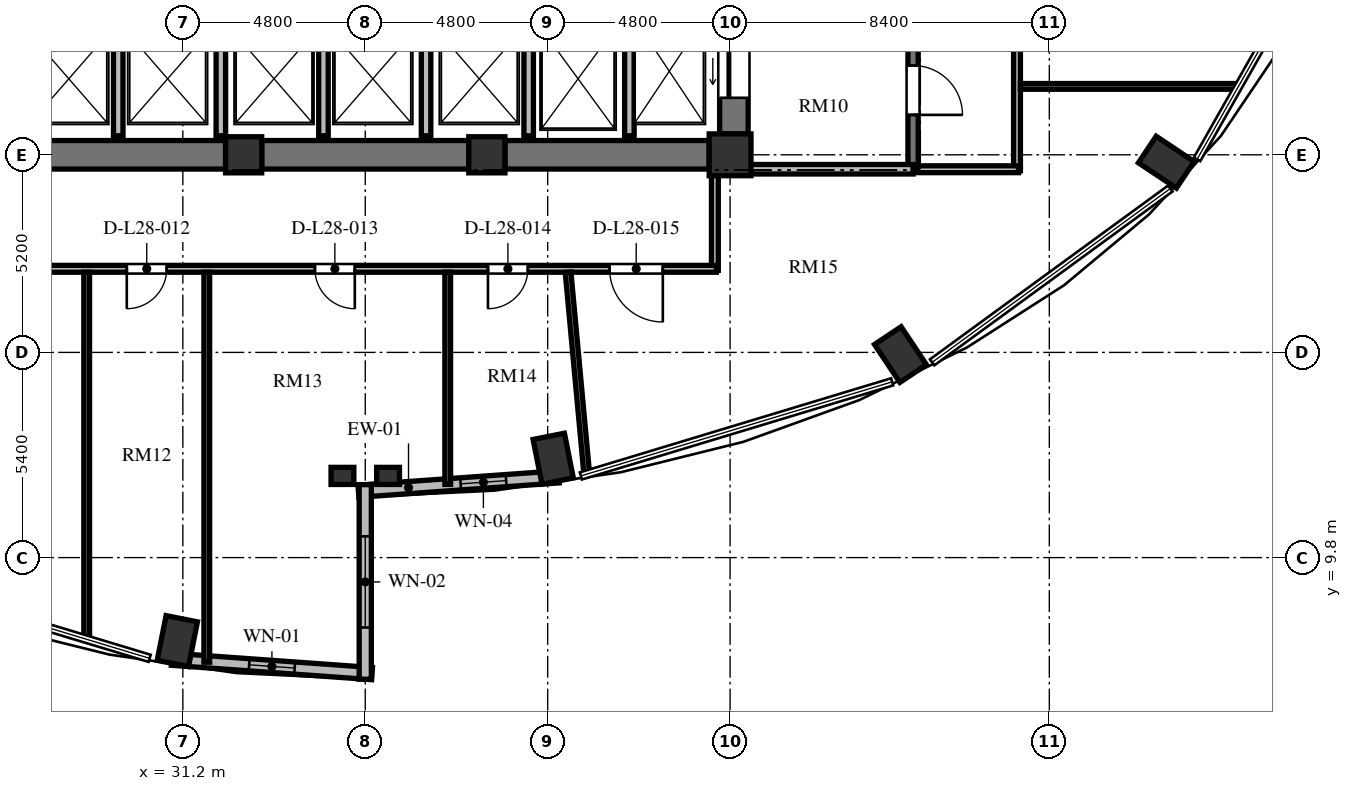
"""IFC4 building model, lengths in metres.
Left out: names, types, materials, properties, quantities, classifications, styles, units other than length and angle.
Written with IfcOpenShell. Run it as: python <this file> out.ifc"""

import sys

from ifc_helpers import new_model, si_unit, direction, frame, frame_2d, origin, origin_2d, place, context, subcontext, project, spatial, rectangle, extrude, element, fill, save


model = new_model("IFC4")
c1 = context("Model", 3, precision=1e-05, world=origin(), true_north=direction((0.0, 1.0)))
c2 = subcontext(c1, "Body", "Model", "MODEL_VIEW")
j1 = project(units=[si_unit("LENGTHUNIT", "METRE"), si_unit("PLANEANGLEUNIT", "RADIAN")], contexts=[c1])
p1 = place(None, origin())
s1 = spatial("IfcSite", under=j1, at=p1, CompositionType="ELEMENT")
p2 = place(p1, origin())
s2 = spatial("IfcBuilding", under=s1, at=p2, CompositionType="ELEMENT")
p3 = place(p2, frame((0.0, 0.0, 110.928)))
s3 = spatial("IfcBuildingStorey", under=s2, at=p3, CompositionType="ELEMENT", Elevation=110.928)
for number, where, z_axis, x_axis in (
    (1, (40.946, 12.403, 0.0), (0.0, 0.0, 1.0), (0.195, -0.981, 0.0)),
    (2, (50.084, 15.143, 0.0), (0.0, 0.0, 1.0), (0.556, -0.831, 0.0)),
    (3, (57.078, 20.205, 0.0), (0.0, 0.0, 1.0), (0.831, -0.556, 0.0)),
    (4, (31.054, 7.603, 0.0), (0.0, 0.0, 1.0), (-0.195, -0.981, 0.0)),
):
    element("IfcColumn", number, at=place(p3, frame(where, z_axis=z_axis, x_axis=x_axis)), inside=s3, PredefinedType="COLUMN", context=c2, shape_type="SweptSolid", body=[
        extrude(rectangle(XDim=1.2, YDim=0.84, at=origin_2d()), origin(), (0.0, 0.0, 1.0), 3.648),
    ])
for number, where, z_axis, x_axis in (
    (5, (32.8, 20.4, 0.0), (0.0, 0.0, 1.0), (1.0, 0.0, 0.0)),
    (6, (39.2, 20.4, 0.0), (0.0, 0.0, 1.0), (1.0, 0.0, 0.0)),
):
    element("IfcColumn", number, at=place(p3, frame(where, z_axis=z_axis, x_axis=x_axis)), inside=s3, PredefinedType="COLUMN", context=c2, shape_type="SweptSolid", body=[
        extrude(rectangle(XDim=0.95, YDim=0.95, at=origin_2d()), origin(), (0.0, 0.0, 1.0), 3.648),
    ])
p4 = place(p3, frame((45.6, 20.4, 0.0), z_axis=(0.0, 0.0, 1.0), x_axis=(1.0, 0.0, 0.0)))
e7 = element("IfcColumn", 7, at=p4, inside=s3, PredefinedType="COLUMN", context=c2, shape_type="SweptSolid", body=[
    extrude(rectangle(XDim=1.1, YDim=1.1, at=origin_2d()), origin(), (0.0, 0.0, 1.0), 3.648),
])
for number, where, z_axis, x_axis in (
    (8, (35.4, 11.95, 0.0), (0.0, 0.0, 1.0), (1.0, 0.0, 0.0)),
    (9, (36.6, 11.95, 0.0), (0.0, 0.0, 1.0), (1.0, 0.0, 0.0)),
):
    element("IfcColumn", number, at=place(p3, frame(where, z_axis=z_axis, x_axis=x_axis)), inside=s3, PredefinedType="PILASTER", context=c2, shape_type="SweptSolid", body=[
        extrude(rectangle(XDim=0.6, YDim=0.45, at=origin_2d()), origin(), (0.0, 0.0, 1.0), 3.648),
    ])
p5 = place(p3, frame((45.7, 20.95, 0.0), z_axis=(0.0, 0.0, 1.0), x_axis=(0.0, 1.0, 0.0)))
e10 = element("IfcWall", 10, at=p5, inside=s3, PredefinedType="SHEAR", context=c2, shape_type="SweptSolid", body=[
    extrude(rectangle(XDim=14.1, YDim=0.75, at=frame_2d((7.05, 0.0))), origin(), (0.0, 0.0, 1.0), 3.648),
])
p6 = place(p5, frame((11.75, 0.0, 0.0)))
e11 = element("IfcOpeningElement", 11, at=p6, cuts=e10, PredefinedType="OPENING", context=c2, shape_type="SweptSolid", body=[
    extrude(rectangle(XDim=1.4, YDim=2.3, at=frame_2d((0.7, 1.15))), frame((0.0, 0.385, 0.0), z_axis=(0.0, -1.0, 0.0), x_axis=(1.0, 0.0, 0.0)), (0.0, 0.0, 1.0), 0.77),
])
p7 = place(p5, frame((0.95, 0.0, 0.0)))
e12 = element("IfcOpeningElement", 12, at=p7, cuts=e10, PredefinedType="OPENING", context=c2, shape_type="SweptSolid", body=[
    extrude(rectangle(XDim=1.4, YDim=2.3, at=frame_2d((0.7, 1.15))), frame((0.0, 0.385, 0.0), z_axis=(0.0, -1.0, 0.0), x_axis=(1.0, 0.0, 0.0)), (0.0, 0.0, 1.0), 0.77),
])
p8 = place(p3, frame((26.95, 20.4, 0.0), z_axis=(0.0, 0.0, 1.0), x_axis=(1.0, 0.0, 0.0)))
e13 = element("IfcWall", 13, at=p8, inside=s3, PredefinedType="SHEAR", context=c2, shape_type="SweptSolid", body=[
    extrude(rectangle(XDim=5.375, YDim=0.75, at=frame_2d((2.688, 0.0))), origin(), (0.0, 0.0, 1.0), 3.648),
])
p9 = place(p3, frame((33.275, 20.4, 0.0), z_axis=(0.0, 0.0, 1.0), x_axis=(1.0, 0.0, 0.0)))
e14 = element("IfcWall", 14, at=p9, inside=s3, PredefinedType="SHEAR", context=c2, shape_type="SweptSolid", body=[
    extrude(rectangle(XDim=5.45, YDim=0.75, at=frame_2d((2.725, 0.0))), origin(), (0.0, 0.0, 1.0), 3.648),
])
p10 = place(p3, frame((39.675, 20.4, 0.0), z_axis=(0.0, 0.0, 1.0), x_axis=(1.0, 0.0, 0.0)))
e15 = element("IfcWall", 15, at=p10, inside=s3, PredefinedType="SHEAR", context=c2, shape_type="SweptSolid", body=[
    extrude(rectangle(XDim=5.375, YDim=0.75, at=frame_2d((2.688, 0.0))), origin(), (0.0, 0.0, 1.0), 3.648),
])
p11 = place(p3, frame((35.821, 11.547, 0.0), z_axis=(0.0, 0.0, 1.0), x_axis=(0.997432364291, 0.071614793619, 0.0)))
e16 = element("IfcWall", 16, at=p11, inside=s3, PredefinedType="SOLIDWALL", context=c2, shape_type="SweptSolid", body=[
    extrude(rectangle(XDim=5.284, YDim=0.32, at=frame_2d((2.642, 0.0))), origin(), (0.0, 0.0, 1.0), 3.428),
])
p12 = place(p11, frame((2.697, 0.0, 0.85)))
e17 = element("IfcOpeningElement", 17, at=p12, cuts=e16, PredefinedType="OPENING", context=c2, shape_type="SweptSolid", body=[
    extrude(rectangle(XDim=1.2, YDim=1.8, at=frame_2d((0.6, 0.9))), frame((0.0, 0.17, 0.0), z_axis=(0.0, -1.0, 0.0), x_axis=(1.0, 0.0, 0.0)), (0.0, 0.0, 1.0), 0.34),
])
p13 = place(p3, frame((30.909, 7.125, 0.0), z_axis=(0.0, 0.0, 1.0), x_axis=(0.997431890304, -0.071621394884, 0.0)))
e18 = element("IfcWall", 18, at=p13, inside=s3, PredefinedType="SOLIDWALL", context=c2, shape_type="SweptSolid", body=[
    extrude(rectangle(XDim=5.284, YDim=0.32, at=frame_2d((2.642, 0.0))), origin(), (0.0, 0.0, 1.0), 3.428),
])
p14 = place(p13, frame((2.042, 0.0, 0.85)))
e19 = element("IfcOpeningElement", 19, at=p14, cuts=e18, PredefinedType="OPENING", context=c2, shape_type="SweptSolid", body=[
    extrude(rectangle(XDim=1.2, YDim=2.2, at=frame_2d((0.6, 1.1))), frame((0.0, 0.17, 0.0), z_axis=(0.0, -1.0, 0.0), x_axis=(1.0, 0.0, 0.0)), (0.0, 0.0, 1.0), 0.34),
])
p15 = place(p3, frame((36.0, 6.6, 0.0), z_axis=(0.0, 0.0, 1.0), x_axis=(0.0, 1.0, 0.0)))
e20 = element("IfcWall", 20, at=p15, inside=s3, PredefinedType="SOLIDWALL", context=c2, shape_type="SweptSolid", body=[
    extrude(rectangle(XDim=5.12, YDim=0.32, at=frame_2d((2.56, 0.0))), origin(), (0.0, 0.0, 1.0), 3.428),
])
p16 = place(p15, frame((1.36, 0.0, 0.84)))
e21 = element("IfcOpeningElement", 21, at=p16, cuts=e20, PredefinedType="OPENING", context=c2, shape_type="SweptSolid", body=[
    extrude(rectangle(XDim=2.4, YDim=2.04, at=frame_2d((1.2, 1.02))), frame((0.0, 0.17, 0.0), z_axis=(0.0, -1.0, 0.0), x_axis=(1.0, 0.0, 0.0)), (0.0, 0.0, 1.0), 0.34),
])
p17 = place(p3, frame((42.95, 20.9, 0.0), z_axis=(0.0, 0.0, 1.0), x_axis=(0.0, 1.0, 0.0)))
e22 = element("IfcWall", 22, at=p17, inside=s3, PredefinedType="SOLIDWALL", context=c2, shape_type="SweptSolid", body=[
    extrude(rectangle(XDim=3.2, YDim=0.25, at=frame_2d((1.6, 0.0))), origin(), (0.0, 0.0, 1.0), 3.428),
])
for number, where, z_axis, x_axis in (
    (23, (29.5, 20.9, 0.0), (0.0, 0.0, 1.0), (0.0, 1.0, 0.0)),
    (24, (32.2, 20.9, 0.0), (0.0, 0.0, 1.0), (0.0, 1.0, 0.0)),
    (25, (34.9, 20.9, 0.0), (0.0, 0.0, 1.0), (0.0, 1.0, 0.0)),
    (26, (37.6, 20.9, 0.0), (0.0, 0.0, 1.0), (0.0, 1.0, 0.0)),
    (27, (40.3, 20.9, 0.0), (0.0, 0.0, 1.0), (0.0, 1.0, 0.0)),
):
    element("IfcWall", number, at=place(p3, frame(where, z_axis=z_axis, x_axis=x_axis)), inside=s3, PredefinedType="SOLIDWALL", context=c2, shape_type="SweptSolid", body=[
        extrude(rectangle(XDim=2.8, YDim=0.25, at=frame_2d((1.4, 0.0))), origin(), (0.0, 0.0, 1.0), 3.428),
    ])
p18 = place(p3, frame((50.415, 35.845, 0.0), z_axis=(0.0, 0.0, 1.0), x_axis=(0.0, -1.0, 0.0)))
e28 = element("IfcWall", 28, at=p18, inside=s3, PredefinedType="SHEAR", context=c2, shape_type="SweptSolid", body=[
    extrude(rectangle(XDim=15.825, YDim=0.27, at=frame_2d((7.913, 0.0))), origin(), (0.0, 0.0, 1.0), 3.648),
])
p19 = place(p18, frame((4.445, 0.0, 0.0)))
e29 = element("IfcOpeningElement", 29, at=p19, cuts=e28, PredefinedType="OPENING", context=c2, shape_type="SweptSolid", body=[
    extrude(rectangle(XDim=1.2, YDim=2.15, at=frame_2d((0.6, 1.075))), frame((0.0, 0.145, 0.0), z_axis=(0.0, -1.0, 0.0), x_axis=(1.0, 0.0, 0.0)), (0.0, 0.0, 1.0), 0.29),
])
p20 = place(p18, frame((1.295, 0.0, 0.0)))
e30 = element("IfcOpeningElement", 30, at=p20, cuts=e28, PredefinedType="OPENING", context=c2, shape_type="SweptSolid", body=[
    extrude(rectangle(XDim=1.3, YDim=2.2, at=frame_2d((0.65, 1.1))), frame((0.0, 0.145, 0.0), z_axis=(0.0, -1.0, 0.0), x_axis=(1.0, 0.0, 0.0)), (0.0, 0.0, 1.0), 0.29),
])
p21 = place(p18, frame((13.095, 0.0, 0.0)))
e31 = element("IfcOpeningElement", 31, at=p21, cuts=e28, PredefinedType="OPENING", context=c2, shape_type="SweptSolid", body=[
    extrude(rectangle(XDim=1.3, YDim=2.2, at=frame_2d((0.65, 1.1))), frame((0.0, 0.145, 0.0), z_axis=(0.0, -1.0, 0.0), x_axis=(1.0, 0.0, 0.0)), (0.0, 0.0, 1.0), 0.29),
])
p22 = place(p3, frame((45.7, 20.02, 0.0), z_axis=(0.0, 0.0, 1.0), x_axis=(1.0, 0.0, 0.0)))
e32 = element("IfcWall", 32, at=p22, inside=s3, PredefinedType="SOLIDWALL", context=c2, shape_type="SweptSolid", body=[
    extrude(rectangle(XDim=4.715, YDim=0.25, at=frame_2d((2.357, 0.0))), origin(), (0.0, 0.0, 1.0), 3.428),
])
p23 = place(p3, frame((53.15, 26.64, 0.0), z_axis=(0.0, 0.0, 1.0), x_axis=(0.0, -1.0, 0.0)))
e33 = element("IfcWall", 33, at=p23, inside=s3, PredefinedType="PARTITIONING", context=c2, shape_type="SweptSolid", body=[
    extrude(rectangle(XDim=6.66, YDim=0.18, at=frame_2d((3.33, 0.0))), origin(), (0.0, 0.0, 1.0), 3.428),
])
p24 = place(p3, frame((53.19, 20.02, 0.0), z_axis=(0.0, 0.0, 1.0), x_axis=(-1.0, 0.0, 0.0)))
e34 = element("IfcWall", 34, at=p24, inside=s3, PredefinedType="PARTITIONING", context=c2, shape_type="SweptSolid", body=[
    extrude(rectangle(XDim=2.65, YDim=0.18, at=frame_2d((1.325, 0.0))), origin(), (0.0, 0.0, 1.0), 3.428),
])
p25 = place(p3, frame((45.2, 19.91, 0.0), z_axis=(0.0, 0.0, 1.0), x_axis=(0.0, -1.0, 0.0)))
e35 = element("IfcWall", 35, at=p25, inside=s3, PredefinedType="PARTITIONING", context=c2, shape_type="SweptSolid", body=[
    extrude(rectangle(XDim=2.55, YDim=0.18, at=frame_2d((1.275, 0.0))), origin(), (0.0, 0.0, 1.0), 3.428),
])
p26 = place(p3, frame((45.24, 17.4, 0.0), z_axis=(0.0, 0.0, 1.0), x_axis=(-1.0, 0.0, 0.0)))
e36 = element("IfcWall", 36, at=p26, inside=s3, PredefinedType="PARTITIONING", context=c2, shape_type="SweptSolid", body=[
    extrude(rectangle(XDim=21.93, YDim=0.18, at=frame_2d((10.965, 0.0))), origin(), (0.0, 0.0, 1.0), 3.053),
])
p27 = place(p26, frame((18.391, 0.0, 0.0)))
e37 = element("IfcOpeningElement", 37, at=p27, cuts=e36, PredefinedType="OPENING", context=c2, shape_type="SweptSolid", body=[
    extrude(rectangle(XDim=1.4, YDim=2.2, at=frame_2d((0.7, 1.1))), frame((0.0, 0.1, 0.0), z_axis=(0.0, -1.0, 0.0), x_axis=(1.0, 0.0, 0.0)), (0.0, 0.0, 1.0), 0.2),
])
p28 = place(p26, frame((14.465, 0.0, 0.0)))
e38 = element("IfcOpeningElement", 38, at=p28, cuts=e36, PredefinedType="OPENING", context=c2, shape_type="SweptSolid", body=[
    extrude(rectangle(XDim=1.05, YDim=2.15, at=frame_2d((0.525, 1.075))), frame((0.0, 0.1, 0.0), z_axis=(0.0, -1.0, 0.0), x_axis=(1.0, 0.0, 0.0)), (0.0, 0.0, 1.0), 0.2),
])
p29 = place(p26, frame((9.515, 0.0, 0.0)))
e39 = element("IfcOpeningElement", 39, at=p29, cuts=e36, PredefinedType="OPENING", context=c2, shape_type="SweptSolid", body=[
    extrude(rectangle(XDim=1.05, YDim=2.15, at=frame_2d((0.525, 1.075))), frame((0.0, 0.1, 0.0), z_axis=(0.0, -1.0, 0.0), x_axis=(1.0, 0.0, 0.0)), (0.0, 0.0, 1.0), 0.2),
])
p30 = place(p26, frame((4.961, 0.0, 0.0)))
e40 = element("IfcOpeningElement", 40, at=p30, cuts=e36, PredefinedType="OPENING", context=c2, shape_type="SweptSolid", body=[
    extrude(rectangle(XDim=1.05, YDim=2.15, at=frame_2d((0.525, 1.075))), frame((0.0, 0.1, 0.0), z_axis=(0.0, -1.0, 0.0), x_axis=(1.0, 0.0, 0.0)), (0.0, 0.0, 1.0), 0.2),
])
p31 = place(p26, frame((1.41, 0.0, 0.0)))
e41 = element("IfcOpeningElement", 41, at=p31, cuts=e36, PredefinedType="OPENING", context=c2, shape_type="SweptSolid", body=[
    extrude(rectangle(XDim=1.4, YDim=2.2, at=frame_2d((0.7, 1.1))), frame((0.0, 0.1, 0.0), z_axis=(0.0, -1.0, 0.0), x_axis=(1.0, 0.0, 0.0)), (0.0, 0.0, 1.0), 0.2),
])
p32 = place(p3, frame((53.24, 22.2, 0.0), z_axis=(0.0, 0.0, 1.0), x_axis=(1.0, 0.0, 0.0)))
e42 = element("IfcWall", 42, at=p32, inside=s3, PredefinedType="PARTITIONING", context=c2, shape_type="SweptSolid", body=[
    extrude(rectangle(XDim=5.731, YDim=0.15, at=frame_2d((2.866, 0.0))), origin(), (0.0, 0.0, 1.0), 3.428),
])
p33 = place(p3, frame((28.67, 7.664, 0.0), z_axis=(0.0, 0.0, 1.0), x_axis=(0.0, 1.0, 0.0)))
e43 = element("IfcWall", 43, at=p33, inside=s3, PredefinedType="PARTITIONING", context=c2, shape_type="SweptSolid", body=[
    extrude(rectangle(XDim=9.646, YDim=0.15, at=frame_2d((4.823, 0.0))), origin(), (0.0, 0.0, 1.0), 3.428),
])
p34 = place(p3, frame((31.83, 7.048, 0.0), z_axis=(0.0, 0.0, 1.0), x_axis=(0.0, 1.0, 0.0)))
e44 = element("IfcWall", 44, at=p34, inside=s3, PredefinedType="PARTITIONING", context=c2, shape_type="SweptSolid", body=[
    extrude(rectangle(XDim=10.262, YDim=0.15, at=frame_2d((5.131, 0.0))), origin(), (0.0, 0.0, 1.0), 2.813),
])
p35 = place(p3, frame((38.17, 11.727, 0.0), z_axis=(0.0, 0.0, 1.0), x_axis=(0.0, 1.0, 0.0)))
e45 = element("IfcWall", 45, at=p35, inside=s3, PredefinedType="PARTITIONING", context=c2, shape_type="SweptSolid", body=[
    extrude(rectangle(XDim=5.583, YDim=0.15, at=frame_2d((2.792, 0.0))), origin(), (0.0, 0.0, 1.0), 3.428),
])
p36 = place(p3, frame((41.829, 11.995, 0.0), z_axis=(0.0, 0.0, 1.0), x_axis=(-0.092106681554, 0.995749144721, 0.0)))
e46 = element("IfcWall", 46, at=p36, inside=s3, PredefinedType="PARTITIONING", context=c2, shape_type="SweptSolid", body=[
    extrude(rectangle(XDim=5.338, YDim=0.15, at=frame_2d((2.669, 0.0))), origin(), (0.0, 0.0, 1.0), 3.428),
])
p37 = place(p12, origin())
e47 = element("IfcWindow", 47, at=p37, inside=s3, PartitioningType="SINGLE_PANEL", PredefinedType="WINDOW", context=c2, shape_type="SweptSolid", body=[
    extrude(rectangle(XDim=1.2, YDim=1.8, at=frame_2d((0.6, 0.9))), frame((0.0, 0.03, 0.0), z_axis=(0.0, -1.0, 0.0), x_axis=(1.0, 0.0, 0.0)), (0.0, 0.0, 1.0), 0.06),
])
fill(e17, e47)
p38 = place(p14, origin())
e48 = element("IfcWindow", 48, at=p38, inside=s3, PartitioningType="SINGLE_PANEL", PredefinedType="WINDOW", context=c2, shape_type="SweptSolid", body=[
    extrude(rectangle(XDim=1.2, YDim=2.2, at=frame_2d((0.6, 1.1))), frame((0.0, 0.03, 0.0), z_axis=(0.0, -1.0, 0.0), x_axis=(1.0, 0.0, 0.0)), (0.0, 0.0, 1.0), 0.06),
])
fill(e19, e48)
p39 = place(p16, origin())
e49 = element("IfcWindow", 49, at=p39, inside=s3, PartitioningType="SINGLE_PANEL", PredefinedType="WINDOW", context=c2, shape_type="SweptSolid", body=[
    extrude(rectangle(XDim=2.4, YDim=2.04, at=frame_2d((1.2, 1.02))), frame((0.0, 0.03, 0.0), z_axis=(0.0, -1.0, 0.0), x_axis=(1.0, 0.0, 0.0)), (0.0, 0.0, 1.0), 0.06),
])
fill(e21, e49)
p40 = place(p7, origin())
e50 = element("IfcDoor", 50, at=p40, inside=s3, OperationType="SLIDING_TO_LEFT", PredefinedType="DOOR", context=c2, shape_type="SweptSolid", body=[
    extrude(rectangle(XDim=1.4, YDim=2.3, at=frame_2d((0.7, 1.15))), frame((0.0, 0.025, 0.0), z_axis=(0.0, -1.0, 0.0), x_axis=(1.0, 0.0, 0.0)), (0.0, 0.0, 1.0), 0.05),
])
fill(e12, e50)
p41 = place(p21, origin())
e51 = element("IfcDoor", 51, at=p41, inside=s3, OperationType="SINGLE_SWING_RIGHT", PredefinedType="DOOR", context=c2, shape_type="SweptSolid", body=[
    extrude(rectangle(XDim=1.3, YDim=2.2, at=frame_2d((0.65, 1.1))), frame((0.0, 0.025, 0.0), z_axis=(0.0, -1.0, 0.0), x_axis=(1.0, 0.0, 0.0)), (0.0, 0.0, 1.0), 0.05),
])
fill(e31, e51)
p42 = place(p28, origin())
e52 = element("IfcDoor", 52, at=p42, inside=s3, OperationType="SINGLE_SWING_RIGHT", PredefinedType="DOOR", context=c2, shape_type="SweptSolid", body=[
    extrude(rectangle(XDim=1.05, YDim=2.15, at=frame_2d((0.525, 1.075))), frame((0.0, 0.025, 0.0), z_axis=(0.0, -1.0, 0.0), x_axis=(1.0, 0.0, 0.0)), (0.0, 0.0, 1.0), 0.05),
])
fill(e38, e52)
p43 = place(p29, origin())
e53 = element("IfcDoor", 53, at=p43, inside=s3, OperationType="SINGLE_SWING_LEFT", PredefinedType="DOOR", context=c2, shape_type="SweptSolid", body=[
    extrude(rectangle(XDim=1.05, YDim=2.15, at=frame_2d((0.525, 1.075))), frame((0.0, 0.025, 0.0), z_axis=(0.0, -1.0, 0.0), x_axis=(1.0, 0.0, 0.0)), (0.0, 0.0, 1.0), 0.05),
])
fill(e39, e53)
p44 = place(p30, origin())
e54 = element("IfcDoor", 54, at=p44, inside=s3, OperationType="SINGLE_SWING_RIGHT", PredefinedType="DOOR", context=c2, shape_type="SweptSolid", body=[
    extrude(rectangle(XDim=1.05, YDim=2.15, at=frame_2d((0.525, 1.075))), frame((0.0, 0.025, 0.0), z_axis=(0.0, -1.0, 0.0), x_axis=(1.0, 0.0, 0.0)), (0.0, 0.0, 1.0), 0.05),
])
fill(e40, e54)
p45 = place(p31, origin())
e55 = element("IfcDoor", 55, at=p45, inside=s3, OperationType="SINGLE_SWING_LEFT", PredefinedType="DOOR", context=c2, shape_type="SweptSolid", body=[
    extrude(rectangle(XDim=1.4, YDim=2.2, at=frame_2d((0.7, 1.1))), frame((0.0, 0.025, 0.0), z_axis=(0.0, -1.0, 0.0), x_axis=(1.0, 0.0, 0.0)), (0.0, 0.0, 1.0), 0.05),
])
fill(e41, e55)
save(model, sys.argv[1])
